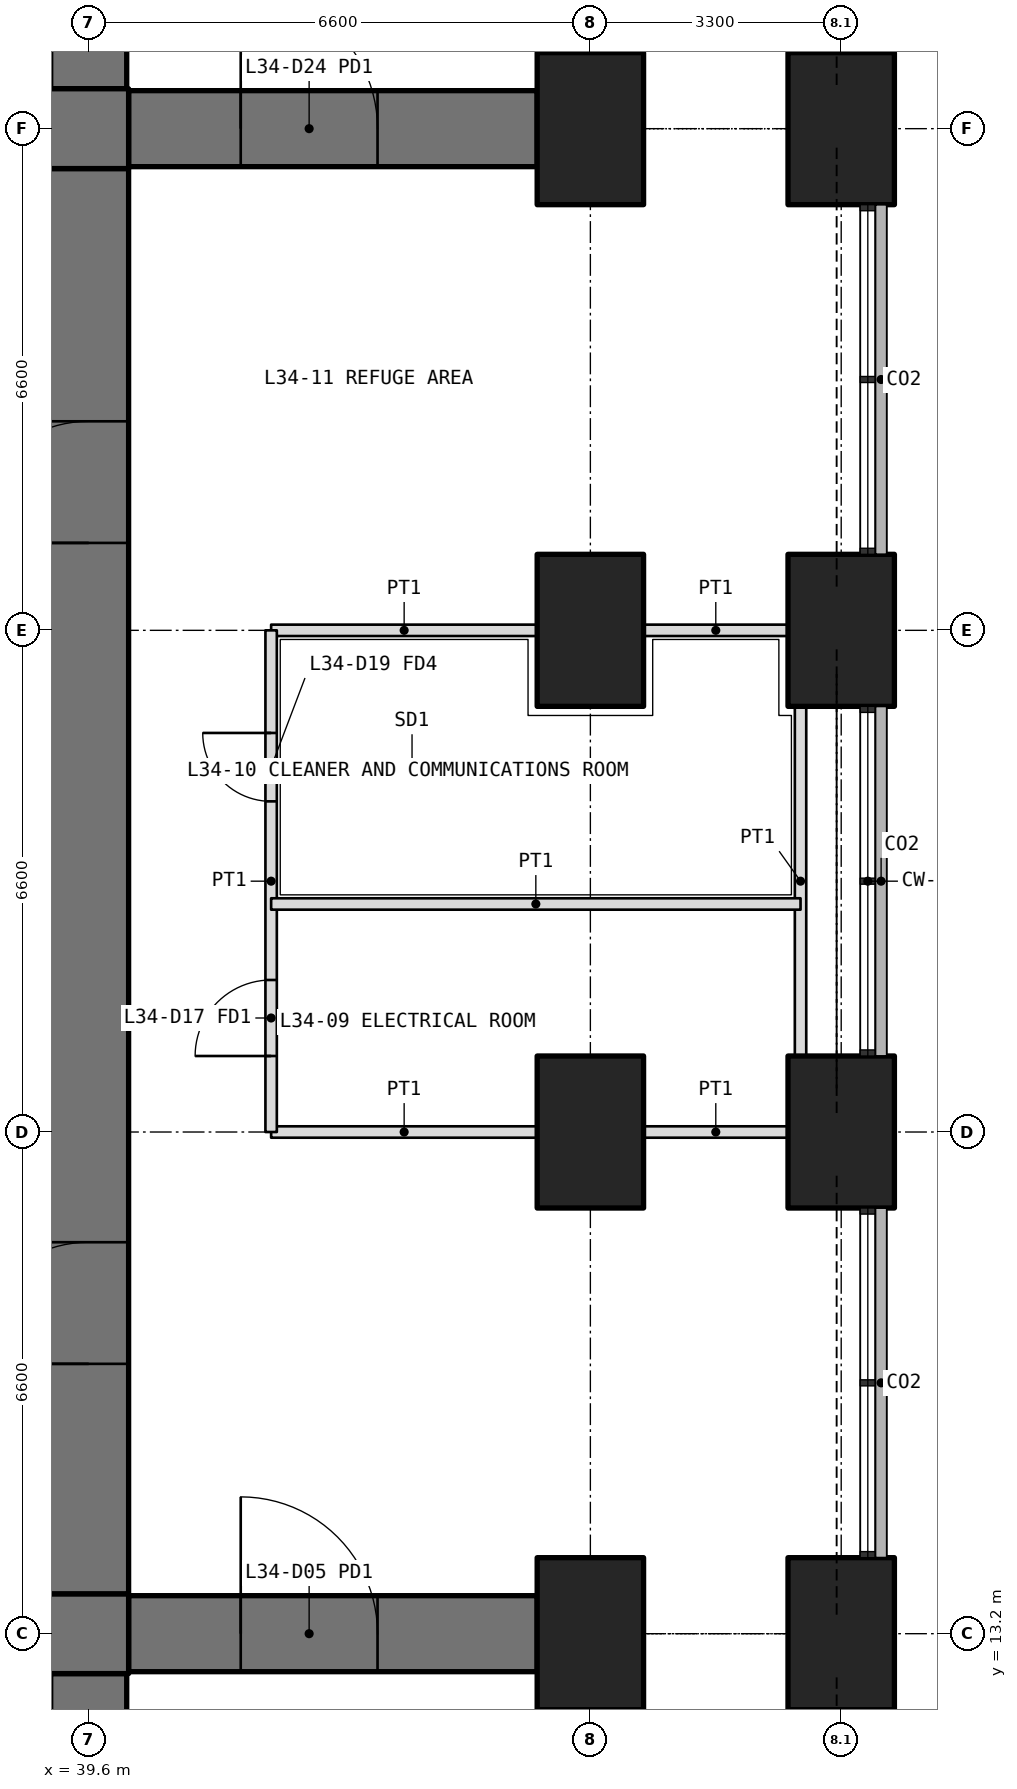
"""IFC4 building model, lengths in metres.
Left out: names, types, materials, properties, quantities, classifications, styles, units other than length and angle.
Written with IfcOpenShell. Run it as: python <this file> out.ifc"""

import sys

from ifc_helpers import new_model, si_unit, direction, frame, frame_2d, origin, origin_2d, place, context, subcontext, project, spatial, rectangle, extrude, element, fill, save


model = new_model("IFC4")
c1 = context("Model", 3, precision=1e-05, world=origin(), true_north=direction((0.0, 1.0)))
c2 = subcontext(c1, "Body", "Model", "MODEL_VIEW")
j1 = project(units=[si_unit("LENGTHUNIT", "METRE"), si_unit("PLANEANGLEUNIT", "RADIAN")], contexts=[c1])
p1 = place(None, origin())
s1 = spatial("IfcSite", under=j1, at=p1, CompositionType="ELEMENT")
p2 = place(p1, origin())
s2 = spatial("IfcBuilding", under=s1, at=p2, CompositionType="ELEMENT")
p3 = place(p2, frame((0.0, 0.0, 149.4)))
s3 = spatial("IfcBuildingStorey", under=s2, at=p3, CompositionType="ELEMENT", Elevation=149.4)
for number, where, z_axis, x_axis in (
    (1, (49.5, 13.2, 0.0), (0.0, 0.0, 1.0), (0.0, 1.0, 0.0)),
    (2, (49.5, 19.8, 0.0), (0.0, 0.0, 1.0), (0.0, 1.0, 0.0)),
    (3, (49.5, 26.4, 0.0), (0.0, 0.0, 1.0), (0.0, 1.0, 0.0)),
    (4, (49.5, 33.0, 0.0), (0.0, 0.0, 1.0), (0.0, 1.0, 0.0)),
    (5, (46.2, 13.2, 0.0), (0.0, 0.0, 1.0), (0.0, 1.0, 0.0)),
    (6, (46.2, 19.8, 0.0), (0.0, 0.0, 1.0), (0.0, 1.0, 0.0)),
    (7, (46.2, 26.4, 0.0), (0.0, 0.0, 1.0), (0.0, 1.0, 0.0)),
    (8, (46.2, 33.0, 0.0), (0.0, 0.0, 1.0), (0.0, 1.0, 0.0)),
):
    element("IfcColumn", number, at=place(p3, frame(where, z_axis=z_axis, x_axis=x_axis)), inside=s3, PredefinedType="COLUMN", context=c2, shape_type="SweptSolid", body=[
        extrude(rectangle(XDim=2.0, YDim=1.4, at=origin_2d()), origin(), (0.0, 0.0, 1.0), 6.3),
    ])
p4 = place(p3, frame((39.6, 12.675, 0.0), z_axis=(0.0, 0.0, 1.0), x_axis=(0.0, -1.0, 0.0)))
e9 = element("IfcWall", 9, at=p4, inside=s3, PredefinedType="SHEAR", context=c2, shape_type="SweptSolid", body=[
    extrude(rectangle(XDim=8.675, YDim=1.0, at=frame_2d((4.337, 0.0))), origin(), (0.0, 0.0, 1.0), 6.0),
])
p5 = place(p4, frame((1.475, 0.0, 0.0)))
e10 = element("IfcOpeningElement", 10, at=p5, cuts=e9, PredefinedType="OPENING", context=c2, shape_type="SweptSolid", body=[
    extrude(rectangle(XDim=1.8, YDim=2.4, at=frame_2d((0.9, 1.2))), frame((0.0, 0.51, 0.0), z_axis=(0.0, -1.0, 0.0), x_axis=(1.0, 0.0, 0.0)), (0.0, 0.0, 1.0), 1.02),
])
p6 = place(p3, frame((39.6, 33.525, 0.0), z_axis=(0.0, 0.0, 1.0), x_axis=(0.0, 1.0, 0.0)))
e11 = element("IfcWall", 11, at=p6, inside=s3, PredefinedType="SHEAR", context=c2, shape_type="SweptSolid", body=[
    extrude(rectangle(XDim=8.675, YDim=1.0, at=frame_2d((4.337, 0.0))), origin(), (0.0, 0.0, 1.0), 6.0),
])
p7 = place(p6, frame((1.475, 0.0, 0.0)))
e12 = element("IfcOpeningElement", 12, at=p7, cuts=e11, PredefinedType="OPENING", context=c2, shape_type="SweptSolid", body=[
    extrude(rectangle(XDim=1.8, YDim=2.4, at=frame_2d((0.9, 1.2))), frame((0.0, 0.51, 0.0), z_axis=(0.0, -1.0, 0.0), x_axis=(1.0, 0.0, 0.0)), (0.0, 0.0, 1.0), 1.02),
])
p8 = place(p3, frame((40.125, 13.2, 0.0), z_axis=(0.0, 0.0, 1.0), x_axis=(1.0, 0.0, 0.0)))
e13 = element("IfcWall", 13, at=p8, inside=s3, PredefinedType="SHEAR", context=c2, shape_type="SweptSolid", body=[
    extrude(rectangle(XDim=5.375, YDim=1.0, at=frame_2d((2.688, 0.0))), origin(), (0.0, 0.0, 1.0), 6.0),
])
p9 = place(p8, frame((1.475, 0.0, 0.0)))
e14 = element("IfcOpeningElement", 14, at=p9, cuts=e13, PredefinedType="OPENING", context=c2, shape_type="SweptSolid", body=[
    extrude(rectangle(XDim=1.8, YDim=2.4, at=frame_2d((0.9, 1.2))), frame((0.0, 0.51, 0.0), z_axis=(0.0, -1.0, 0.0), x_axis=(1.0, 0.0, 0.0)), (0.0, 0.0, 1.0), 1.02),
])
p10 = place(p3, frame((40.125, 33.0, 0.0), z_axis=(0.0, 0.0, 1.0), x_axis=(1.0, 0.0, 0.0)))
e15 = element("IfcWall", 15, at=p10, inside=s3, PredefinedType="SHEAR", context=c2, shape_type="SweptSolid", body=[
    extrude(rectangle(XDim=5.375, YDim=1.0, at=frame_2d((2.688, 0.0))), origin(), (0.0, 0.0, 1.0), 6.0),
])
p11 = place(p10, frame((1.475, 0.0, 0.0)))
e16 = element("IfcOpeningElement", 16, at=p11, cuts=e15, PredefinedType="OPENING", context=c2, shape_type="SweptSolid", body=[
    extrude(rectangle(XDim=1.8, YDim=2.4, at=frame_2d((0.9, 1.2))), frame((0.0, 0.51, 0.0), z_axis=(0.0, -1.0, 0.0), x_axis=(1.0, 0.0, 0.0)), (0.0, 0.0, 1.0), 1.02),
])
p12 = place(p3, frame((12.675, 13.2, 0.0), z_axis=(0.0, 0.0, 1.0), x_axis=(1.0, 0.0, 0.0)))
e17 = element("IfcWall", 17, at=p12, inside=s3, PredefinedType="SHEAR", context=c2, shape_type="SweptSolid", body=[
    extrude(rectangle(XDim=27.45, YDim=1.05, at=frame_2d((13.725, 0.0))), origin(), (0.0, 0.0, 1.0), 6.3),
])
p13 = place(p3, frame((39.6, 13.725, 0.0), z_axis=(0.0, 0.0, 1.0), x_axis=(0.0, 1.0, 0.0)))
e18 = element("IfcWall", 18, at=p13, inside=s3, PredefinedType="SHEAR", context=c2, shape_type="SweptSolid", body=[
    extrude(rectangle(XDim=18.75, YDim=1.05, at=frame_2d((9.375, 0.0))), origin(), (0.0, 0.0, 1.0), 6.3),
])
p14 = place(p13, frame((3.025, 0.0, 0.0)))
e19 = element("IfcOpeningElement", 19, at=p14, cuts=e18, PredefinedType="OPENING", context=c2, shape_type="SweptSolid", body=[
    extrude(rectangle(XDim=1.6, YDim=2.1, at=frame_2d((0.8, 1.05))), frame((0.0, 0.535, 0.0), z_axis=(0.0, -1.0, 0.0), x_axis=(1.0, 0.0, 0.0)), (0.0, 0.0, 1.0), 1.07),
])
p15 = place(p13, frame((13.825, 0.0, 0.0)))
e20 = element("IfcOpeningElement", 20, at=p15, cuts=e18, PredefinedType="OPENING", context=c2, shape_type="SweptSolid", body=[
    extrude(rectangle(XDim=1.6, YDim=2.1, at=frame_2d((0.8, 1.05))), frame((0.0, 0.535, 0.0), z_axis=(0.0, -1.0, 0.0), x_axis=(1.0, 0.0, 0.0)), (0.0, 0.0, 1.0), 1.07),
])
p16 = place(p3, frame((40.125, 33.0, 0.0), z_axis=(0.0, 0.0, 1.0), x_axis=(-1.0, 0.0, 0.0)))
e21 = element("IfcWall", 21, at=p16, inside=s3, PredefinedType="SHEAR", context=c2, shape_type="SweptSolid", body=[
    extrude(rectangle(XDim=27.45, YDim=1.05, at=frame_2d((13.725, 0.0))), origin(), (0.0, 0.0, 1.0), 6.3),
])
p17 = place(p3, frame((48.8, 19.8, 0.0), z_axis=(0.0, 0.0, 1.0), x_axis=(-1.0, 0.0, 0.0)))
e22 = element("IfcWall", 22, at=p17, inside=s3, PredefinedType="PARTITIONING", context=c2, shape_type="SweptSolid", body=[
    extrude(rectangle(XDim=1.9, YDim=0.15, at=frame_2d((0.95, 0.0))), origin(), (0.0, 0.0, 1.0), 4.0),
])
for number, where, z_axis, x_axis in (
    (23, (45.5, 19.8, 0.0), (0.0, 0.0, 1.0), (-1.0, 0.0, 0.0)),
    (24, (42.0, 26.4, 0.0), (0.0, 0.0, 1.0), (1.0, 0.0, 0.0)),
):
    element("IfcWall", number, at=place(p3, frame(where, z_axis=z_axis, x_axis=x_axis)), inside=s3, PredefinedType="PARTITIONING", context=c2, shape_type="SweptSolid", body=[
        extrude(rectangle(XDim=3.5, YDim=0.15, at=frame_2d((1.75, 0.0))), origin(), (0.0, 0.0, 1.0), 4.0),
    ])
p18 = place(p3, frame((46.9, 26.4, 0.0), z_axis=(0.0, 0.0, 1.0), x_axis=(1.0, 0.0, 0.0)))
e25 = element("IfcWall", 25, at=p18, inside=s3, PredefinedType="PARTITIONING", context=c2, shape_type="SweptSolid", body=[
    extrude(rectangle(XDim=1.9, YDim=0.15, at=frame_2d((0.95, 0.0))), origin(), (0.0, 0.0, 1.0), 4.0),
])
p19 = place(p3, frame((42.0, 19.8, 0.0), z_axis=(0.0, 0.0, 1.0), x_axis=(0.0, 1.0, 0.0)))
e26 = element("IfcWall", 26, at=p19, inside=s3, PredefinedType="PARTITIONING", context=c2, shape_type="SweptSolid", body=[
    extrude(rectangle(XDim=6.6, YDim=0.15, at=frame_2d((3.3, 0.0))), origin(), (0.0, 0.0, 1.0), 4.0),
])
p20 = place(p19, frame((1.0, 0.0, 0.0)))
e27 = element("IfcOpeningElement", 27, at=p20, cuts=e26, PredefinedType="OPENING", context=c2, shape_type="SweptSolid", body=[
    extrude(rectangle(XDim=1.0, YDim=2.1, at=frame_2d((0.5, 1.05))), frame((0.0, 0.085, 0.0), z_axis=(0.0, -1.0, 0.0), x_axis=(1.0, 0.0, 0.0)), (0.0, 0.0, 1.0), 0.17),
])
p21 = place(p19, frame((4.35, 0.0, 0.0)))
e28 = element("IfcOpeningElement", 28, at=p21, cuts=e26, PredefinedType="OPENING", context=c2, shape_type="SweptSolid", body=[
    extrude(rectangle(XDim=0.9, YDim=2.1, at=frame_2d((0.45, 1.05))), frame((0.0, 0.085, 0.0), z_axis=(0.0, -1.0, 0.0), x_axis=(1.0, 0.0, 0.0)), (0.0, 0.0, 1.0), 0.17),
])
p22 = place(p3, frame((48.965, 25.4, 0.0), z_axis=(0.0, 0.0, 1.0), x_axis=(0.0, -1.0, 0.0)))
e29 = element("IfcWall", 29, at=p22, inside=s3, PredefinedType="PARTITIONING", context=c2, shape_type="SweptSolid", body=[
    extrude(rectangle(XDim=4.6, YDim=0.15, at=frame_2d((2.3, 0.0))), origin(), (0.0, 0.0, 1.0), 4.0),
])
p23 = place(p3, frame((42.0, 22.8, 0.0), z_axis=(0.0, 0.0, 1.0), x_axis=(1.0, 0.0, 0.0)))
e30 = element("IfcWall", 30, at=p23, inside=s3, PredefinedType="PARTITIONING", context=c2, shape_type="SweptSolid", body=[
    extrude(rectangle(XDim=6.965, YDim=0.15, at=frame_2d((3.482, 0.0))), origin(), (0.0, 0.0, 1.0), 4.0),
])
p24 = place(p20, origin())
e31 = element("IfcDoor", 31, at=p24, inside=s3, OperationType="SINGLE_SWING_LEFT", PredefinedType="DOOR", context=c2, shape_type="SweptSolid", body=[
    extrude(rectangle(XDim=1.0, YDim=2.1, at=frame_2d((0.5, 1.05))), frame((0.0, 0.025, 0.0), z_axis=(0.0, -1.0, 0.0), x_axis=(1.0, 0.0, 0.0)), (0.0, 0.0, 1.0), 0.05),
])
fill(e27, e31)
p25 = place(p21, origin())
e32 = element("IfcDoor", 32, at=p25, inside=s3, OperationType="SINGLE_SWING_RIGHT", PredefinedType="DOOR", context=c2, shape_type="SweptSolid", body=[
    extrude(rectangle(XDim=0.9, YDim=2.1, at=frame_2d((0.45, 1.05))), frame((0.0, 0.025, 0.0), z_axis=(0.0, -1.0, 0.0), x_axis=(1.0, 0.0, 0.0)), (0.0, 0.0, 1.0), 0.05),
])
fill(e28, e32)
p26 = place(p9, origin())
e33 = element("IfcDoor", 33, at=p26, inside=s3, OperationType="DOUBLE_DOOR_SINGLE_SWING", PredefinedType="DOOR", context=c2, shape_type="SweptSolid", body=[
    extrude(rectangle(XDim=1.8, YDim=2.4, at=frame_2d((0.9, 1.2))), frame((0.0, 0.025, 0.0), z_axis=(0.0, -1.0, 0.0), x_axis=(1.0, 0.0, 0.0)), (0.0, 0.0, 1.0), 0.05),
])
fill(e14, e33)
p27 = place(p11, origin())
e34 = element("IfcDoor", 34, at=p27, inside=s3, OperationType="DOUBLE_DOOR_SINGLE_SWING", PredefinedType="DOOR", context=c2, shape_type="SweptSolid", body=[
    extrude(rectangle(XDim=1.8, YDim=2.4, at=frame_2d((0.9, 1.2))), frame((0.0, 0.025, 0.0), z_axis=(0.0, -1.0, 0.0), x_axis=(1.0, 0.0, 0.0)), (0.0, 0.0, 1.0), 0.05),
])
fill(e16, e34)
p28 = place(p14, origin())
e35 = element("IfcDoor", 35, at=p28, inside=s3, OperationType="DOUBLE_DOOR_DOUBLE_SWING", PredefinedType="DOOR", context=c2, shape_type="SweptSolid", body=[
    extrude(rectangle(XDim=1.6, YDim=2.1, at=frame_2d((0.8, 1.05))), frame((0.0, 0.025, 0.0), z_axis=(0.0, -1.0, 0.0), x_axis=(1.0, 0.0, 0.0)), (0.0, 0.0, 1.0), 0.05),
])
fill(e19, e35)
p29 = place(p15, origin())
e36 = element("IfcDoor", 36, at=p29, inside=s3, OperationType="DOUBLE_DOOR_DOUBLE_SWING", PredefinedType="DOOR", context=c2, shape_type="SweptSolid", body=[
    extrude(rectangle(XDim=1.6, YDim=2.1, at=frame_2d((0.8, 1.05))), frame((0.0, 0.025, 0.0), z_axis=(0.0, -1.0, 0.0), x_axis=(1.0, 0.0, 0.0)), (0.0, 0.0, 1.0), 0.05),
])
fill(e20, e36)
save(model, sys.argv[1])
